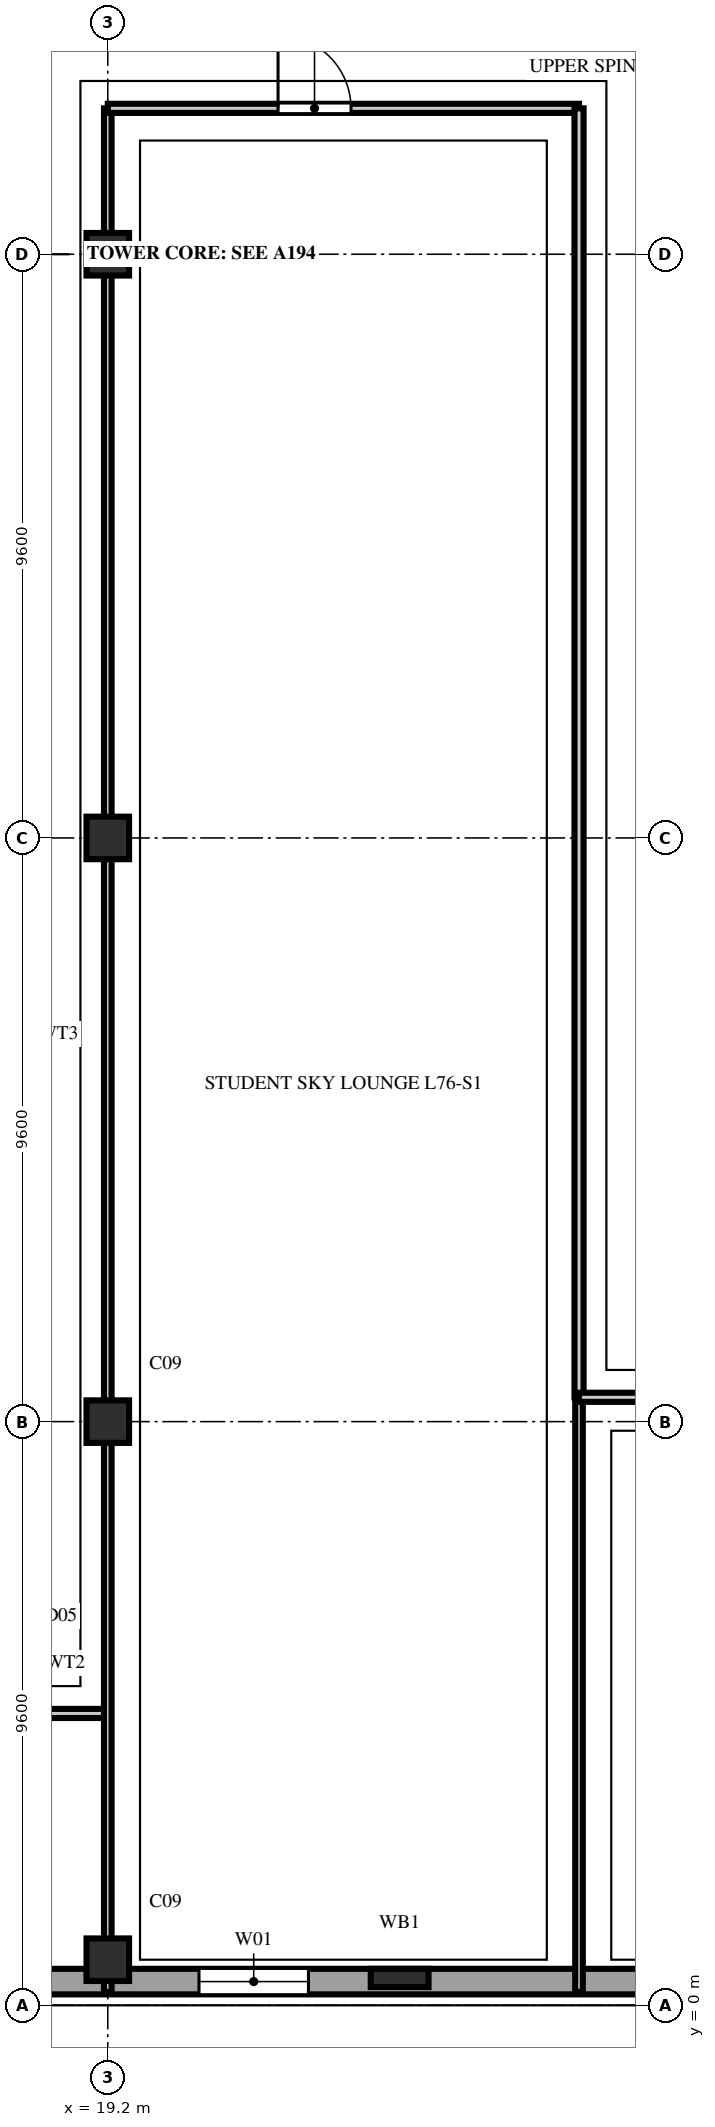
"""IFC4 building model, lengths in metres.
Left out: names, types, materials, properties, quantities, classifications, styles, units other than length and angle.
Written with IfcOpenShell. Run it as: python <this file> out.ifc"""

import sys

from ifc_helpers import new_model, si_unit, direction, frame, frame_2d, origin, origin_2d, place, context, subcontext, project, spatial, rectangle, extrude, element, fill, save


model = new_model("IFC4")
c1 = context("Model", 3, precision=1e-05, world=origin(), true_north=direction((0.0, 1.0)))
c2 = subcontext(c1, "Body", "Model", "MODEL_VIEW")
j1 = project(units=[si_unit("LENGTHUNIT", "METRE"), si_unit("PLANEANGLEUNIT", "RADIAN")], contexts=[c1])
p1 = place(None, origin())
s1 = spatial("IfcSite", under=j1, at=p1, CompositionType="ELEMENT")
p2 = place(p1, origin())
s2 = spatial("IfcBuilding", under=s1, at=p2, CompositionType="ELEMENT")
p3 = place(p2, frame((0.0, 0.0, 300.0)))
s3 = spatial("IfcBuildingStorey", under=s2, at=p3, CompositionType="ELEMENT", Elevation=300.0)
for number, where, z_axis, x_axis in (
    (1, (19.2, 0.75, 0.0), (0.0, 0.0, 1.0), (1.0, 0.0, 0.0)),
    (2, (19.2, 9.6, 0.0), (0.0, 0.0, 1.0), (1.0, 0.0, 0.0)),
    (3, (19.2, 19.2, 0.0), (0.0, 0.0, 1.0), (1.0, 0.0, 0.0)),
    (4, (19.2, 28.8, 0.0), (0.0, 0.0, 1.0), (1.0, 0.0, 0.0)),
):
    element("IfcColumn", number, at=place(p3, frame(where, z_axis=z_axis, x_axis=x_axis)), inside=s3, PredefinedType="COLUMN", context=c2, shape_type="SweptSolid", body=[
        extrude(rectangle(XDim=0.7, YDim=0.7, at=origin_2d()), origin(), (0.0, 0.0, 1.0), 3.8),
    ])
p4 = place(p3, frame((24.0, 0.45, 0.0), z_axis=(0.0, 0.0, 1.0), x_axis=(1.0, 0.0, 0.0)))
e5 = element("IfcColumn", 5, at=p4, inside=s3, PredefinedType="PILASTER", context=c2, shape_type="SweptSolid", body=[
    extrude(rectangle(XDim=0.95, YDim=0.3, at=origin_2d()), origin(), (0.0, 0.0, 1.0), 3.8),
])
p5 = place(p3, frame((1.84, 0.39, 0.0), z_axis=(0.0, 0.0, 1.0), x_axis=(1.0, 0.0, 0.0)))
e6 = element("IfcWall", 6, at=p5, inside=s3, PredefinedType="SOLIDWALL", context=c2, shape_type="SweptSolid", body=[
    extrude(rectangle(XDim=44.32, YDim=0.42, at=frame_2d((22.16, 0.0))), origin(), (0.0, 0.0, 1.0), 3.54),
])
p6 = place(p5, frame((4.46, 0.0, 0.85)))
e7 = element("IfcOpeningElement", 7, at=p6, cuts=e6, PredefinedType="OPENING", context=c2, shape_type="SweptSolid", body=[
    extrude(rectangle(XDim=1.8, YDim=1.85, at=frame_2d((0.9, 0.925))), frame((0.0, 0.222, 0.0), z_axis=(0.0, -1.0, 0.0), x_axis=(1.0, 0.0, 0.0)), (0.0, 0.0, 1.0), 0.444),
])
p7 = place(p5, frame((9.26, 0.0, 0.85)))
e8 = element("IfcOpeningElement", 8, at=p7, cuts=e6, PredefinedType="OPENING", context=c2, shape_type="SweptSolid", body=[
    extrude(rectangle(XDim=1.8, YDim=1.85, at=frame_2d((0.9, 0.925))), frame((0.0, 0.222, 0.0), z_axis=(0.0, -1.0, 0.0), x_axis=(1.0, 0.0, 0.0)), (0.0, 0.0, 1.0), 0.444),
])
p8 = place(p5, frame((18.86, 0.0, 0.85)))
e9 = element("IfcOpeningElement", 9, at=p8, cuts=e6, PredefinedType="OPENING", context=c2, shape_type="SweptSolid", body=[
    extrude(rectangle(XDim=1.8, YDim=1.85, at=frame_2d((0.9, 0.925))), frame((0.0, 0.222, 0.0), z_axis=(0.0, -1.0, 0.0), x_axis=(1.0, 0.0, 0.0)), (0.0, 0.0, 1.0), 0.444),
])
p9 = place(p5, frame((28.46, 0.0, 0.85)))
e10 = element("IfcOpeningElement", 10, at=p9, cuts=e6, PredefinedType="OPENING", context=c2, shape_type="SweptSolid", body=[
    extrude(rectangle(XDim=1.8, YDim=1.85, at=frame_2d((0.9, 0.925))), frame((0.0, 0.222, 0.0), z_axis=(0.0, -1.0, 0.0), x_axis=(1.0, 0.0, 0.0)), (0.0, 0.0, 1.0), 0.444),
])
p10 = place(p5, frame((33.26, 0.0, 0.85)))
e11 = element("IfcOpeningElement", 11, at=p10, cuts=e6, PredefinedType="OPENING", context=c2, shape_type="SweptSolid", body=[
    extrude(rectangle(XDim=1.8, YDim=1.85, at=frame_2d((0.9, 0.925))), frame((0.0, 0.222, 0.0), z_axis=(0.0, -1.0, 0.0), x_axis=(1.0, 0.0, 0.0)), (0.0, 0.0, 1.0), 0.444),
])
p11 = place(p5, frame((38.06, 0.0, 0.85)))
e12 = element("IfcOpeningElement", 12, at=p11, cuts=e6, PredefinedType="OPENING", context=c2, shape_type="SweptSolid", body=[
    extrude(rectangle(XDim=1.8, YDim=1.85, at=frame_2d((0.9, 0.925))), frame((0.0, 0.222, 0.0), z_axis=(0.0, -1.0, 0.0), x_axis=(1.0, 0.0, 0.0)), (0.0, 0.0, 1.0), 0.444),
])
p12 = place(p3, frame((17.05, 4.8, 0.0), z_axis=(0.0, 0.0, 1.0), x_axis=(1.0, 0.0, 0.0)))
e13 = element("IfcWall", 13, at=p12, inside=s3, PredefinedType="PARTITIONING", context=c2, shape_type="SweptSolid", body=[
    extrude(rectangle(XDim=2.15, YDim=0.15, at=frame_2d((1.075, 0.0))), origin(), (0.0, 0.0, 1.0), 3.54),
])
p13 = place(p3, frame((19.2, 0.22, 0.0), z_axis=(0.0, 0.0, 1.0), x_axis=(0.0, 1.0, 0.0)))
e14 = element("IfcWall", 14, at=p13, inside=s3, PredefinedType="PARTITIONING", context=c2, shape_type="SweptSolid", body=[
    extrude(rectangle(XDim=0.53, YDim=0.125, at=frame_2d((0.265, 0.0))), origin(), (0.0, 0.0, 1.0), 3.54),
])
p14 = place(p3, frame((19.2, 0.75, 0.0), z_axis=(0.0, 0.0, 1.0), x_axis=(0.0, 1.0, 0.0)))
e15 = element("IfcWall", 15, at=p14, inside=s3, PredefinedType="PARTITIONING", context=c2, shape_type="SweptSolid", body=[
    extrude(rectangle(XDim=30.45, YDim=0.125, at=frame_2d((15.225, 0.0))), origin(), (0.0, 0.0, 1.0), 3.232),
])
p15 = place(p3, frame((19.2, 31.2, 0.0), z_axis=(0.0, 0.0, 1.0), x_axis=(1.0, 0.0, 0.0)))
e16 = element("IfcWall", 16, at=p15, inside=s3, PredefinedType="PARTITIONING", context=c2, shape_type="SweptSolid", body=[
    extrude(rectangle(XDim=7.75, YDim=0.15, at=frame_2d((3.875, 0.0))), origin(), (0.0, 0.0, 1.0), 3.54),
])
p16 = place(p15, frame((2.8, 0.0, 0.0)))
e17 = element("IfcOpeningElement", 17, at=p16, cuts=e16, PredefinedType="OPENING", context=c2, shape_type="SweptSolid", body=[
    extrude(rectangle(XDim=1.2, YDim=2.2, at=frame_2d((0.6, 1.1))), frame((0.0, 0.087, 0.0), z_axis=(0.0, -1.0, 0.0), x_axis=(1.0, 0.0, 0.0)), (0.0, 0.0, 1.0), 0.174),
])
p17 = place(p3, frame((26.95, 0.22, 0.0), z_axis=(0.0, 0.0, 1.0), x_axis=(0.0, 1.0, 0.0)))
e18 = element("IfcWall", 18, at=p17, inside=s3, PredefinedType="PARTITIONING", context=c2, shape_type="SweptSolid", body=[
    extrude(rectangle(XDim=9.78, YDim=0.125, at=frame_2d((4.89, 0.0))), origin(), (0.0, 0.0, 1.0), 3.54),
])
p18 = place(p3, frame((26.95, 10.0, 0.0), z_axis=(0.0, 0.0, 1.0), x_axis=(0.0, 1.0, 0.0)))
e19 = element("IfcWall", 19, at=p18, inside=s3, PredefinedType="PARTITIONING", context=c2, shape_type="SweptSolid", body=[
    extrude(rectangle(XDim=21.2, YDim=0.15, at=frame_2d((10.6, 0.0))), origin(), (0.0, 0.0, 1.0), 3.54),
])
p19 = place(p3, frame((26.95, 10.0, 0.0), z_axis=(0.0, 0.0, 1.0), x_axis=(1.0, 0.0, 0.0)))
e20 = element("IfcWall", 20, at=p19, inside=s3, PredefinedType="PARTITIONING", context=c2, shape_type="SweptSolid", body=[
    extrude(rectangle(XDim=2.63, YDim=0.15, at=frame_2d((1.315, 0.0))), origin(), (0.0, 0.0, 1.0), 3.54),
])
p20 = place(p8, origin())
e21 = element("IfcWindow", 21, at=p20, inside=s3, PartitioningType="DOUBLE_PANEL_VERTICAL", PredefinedType="WINDOW", context=c2, shape_type="SweptSolid", body=[
    extrude(rectangle(XDim=1.8, YDim=1.85, at=frame_2d((0.9, 0.925))), frame((0.0, 0.11, 0.0), z_axis=(0.0, -1.0, 0.0), x_axis=(1.0, 0.0, 0.0)), (0.0, 0.0, 1.0), 0.06),
])
fill(e9, e21)
p21 = place(p16, origin())
e22 = element("IfcDoor", 22, at=p21, inside=s3, OperationType="SINGLE_SWING_LEFT", PredefinedType="DOOR", context=c2, shape_type="SweptSolid", body=[
    extrude(rectangle(XDim=1.2, YDim=2.2, at=frame_2d((0.6, 1.1))), frame((0.0, 0.025, 0.0), z_axis=(0.0, -1.0, 0.0), x_axis=(1.0, 0.0, 0.0)), (0.0, 0.0, 1.0), 0.05),
])
fill(e17, e22)
save(model, sys.argv[1])
